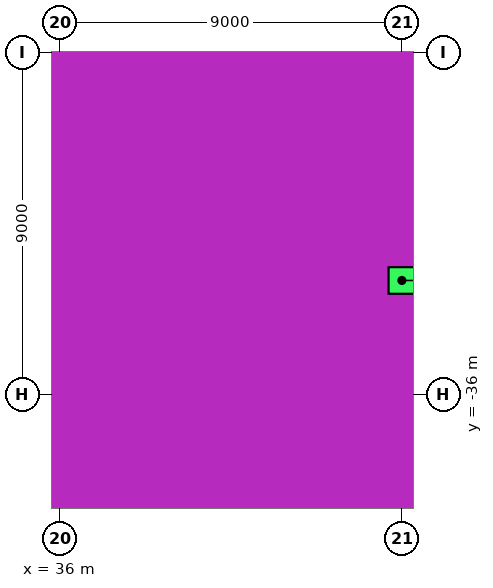
"""IFC4 building model, lengths in metres.
Left out: names, types, materials, properties, quantities, classifications, styles, units other than length and angle.
Written with IfcOpenShell. Run it as: python <this file> out.ifc"""

import sys

from ifc_helpers import new_model, si_unit, direction, frame, origin, origin_2d, place, context, subcontext, project, spatial, rectangle, extrude, element, save


model = new_model("IFC4")
c1 = context("Model", 3, precision=1e-05, world=origin(), true_north=direction((0.0, 1.0)))
c2 = subcontext(c1, "Body", "Model", "MODEL_VIEW")
j1 = project(units=[si_unit("LENGTHUNIT", "METRE"), si_unit("PLANEANGLEUNIT", "RADIAN")], contexts=[c1])
p1 = place(None, origin())
s1 = spatial("IfcSite", under=j1, at=p1, CompositionType="ELEMENT")
p2 = place(p1, origin())
s2 = spatial("IfcBuilding", under=s1, at=p2, CompositionType="ELEMENT")
p3 = place(p2, frame((0.0, 0.0, -4.5)))
s3 = spatial("IfcBuildingStorey", under=s2, at=p3, CompositionType="ELEMENT", Elevation=-4.5)
p4 = place(p3, frame((45.0, -33.0, 0.0), z_axis=(0.0, 0.0, 1.0), x_axis=(1.0, 0.0, 0.0)))
e1 = element("IfcColumn", 1, at=p4, inside=s3, PredefinedType="COLUMN", context=c2, shape_type="SweptSolid", body=[
    extrude(rectangle(XDim=0.7, YDim=0.7, at=origin_2d()), origin(), (0.0, 0.0, 1.0), 4.0),
])
save(model, sys.argv[1])
